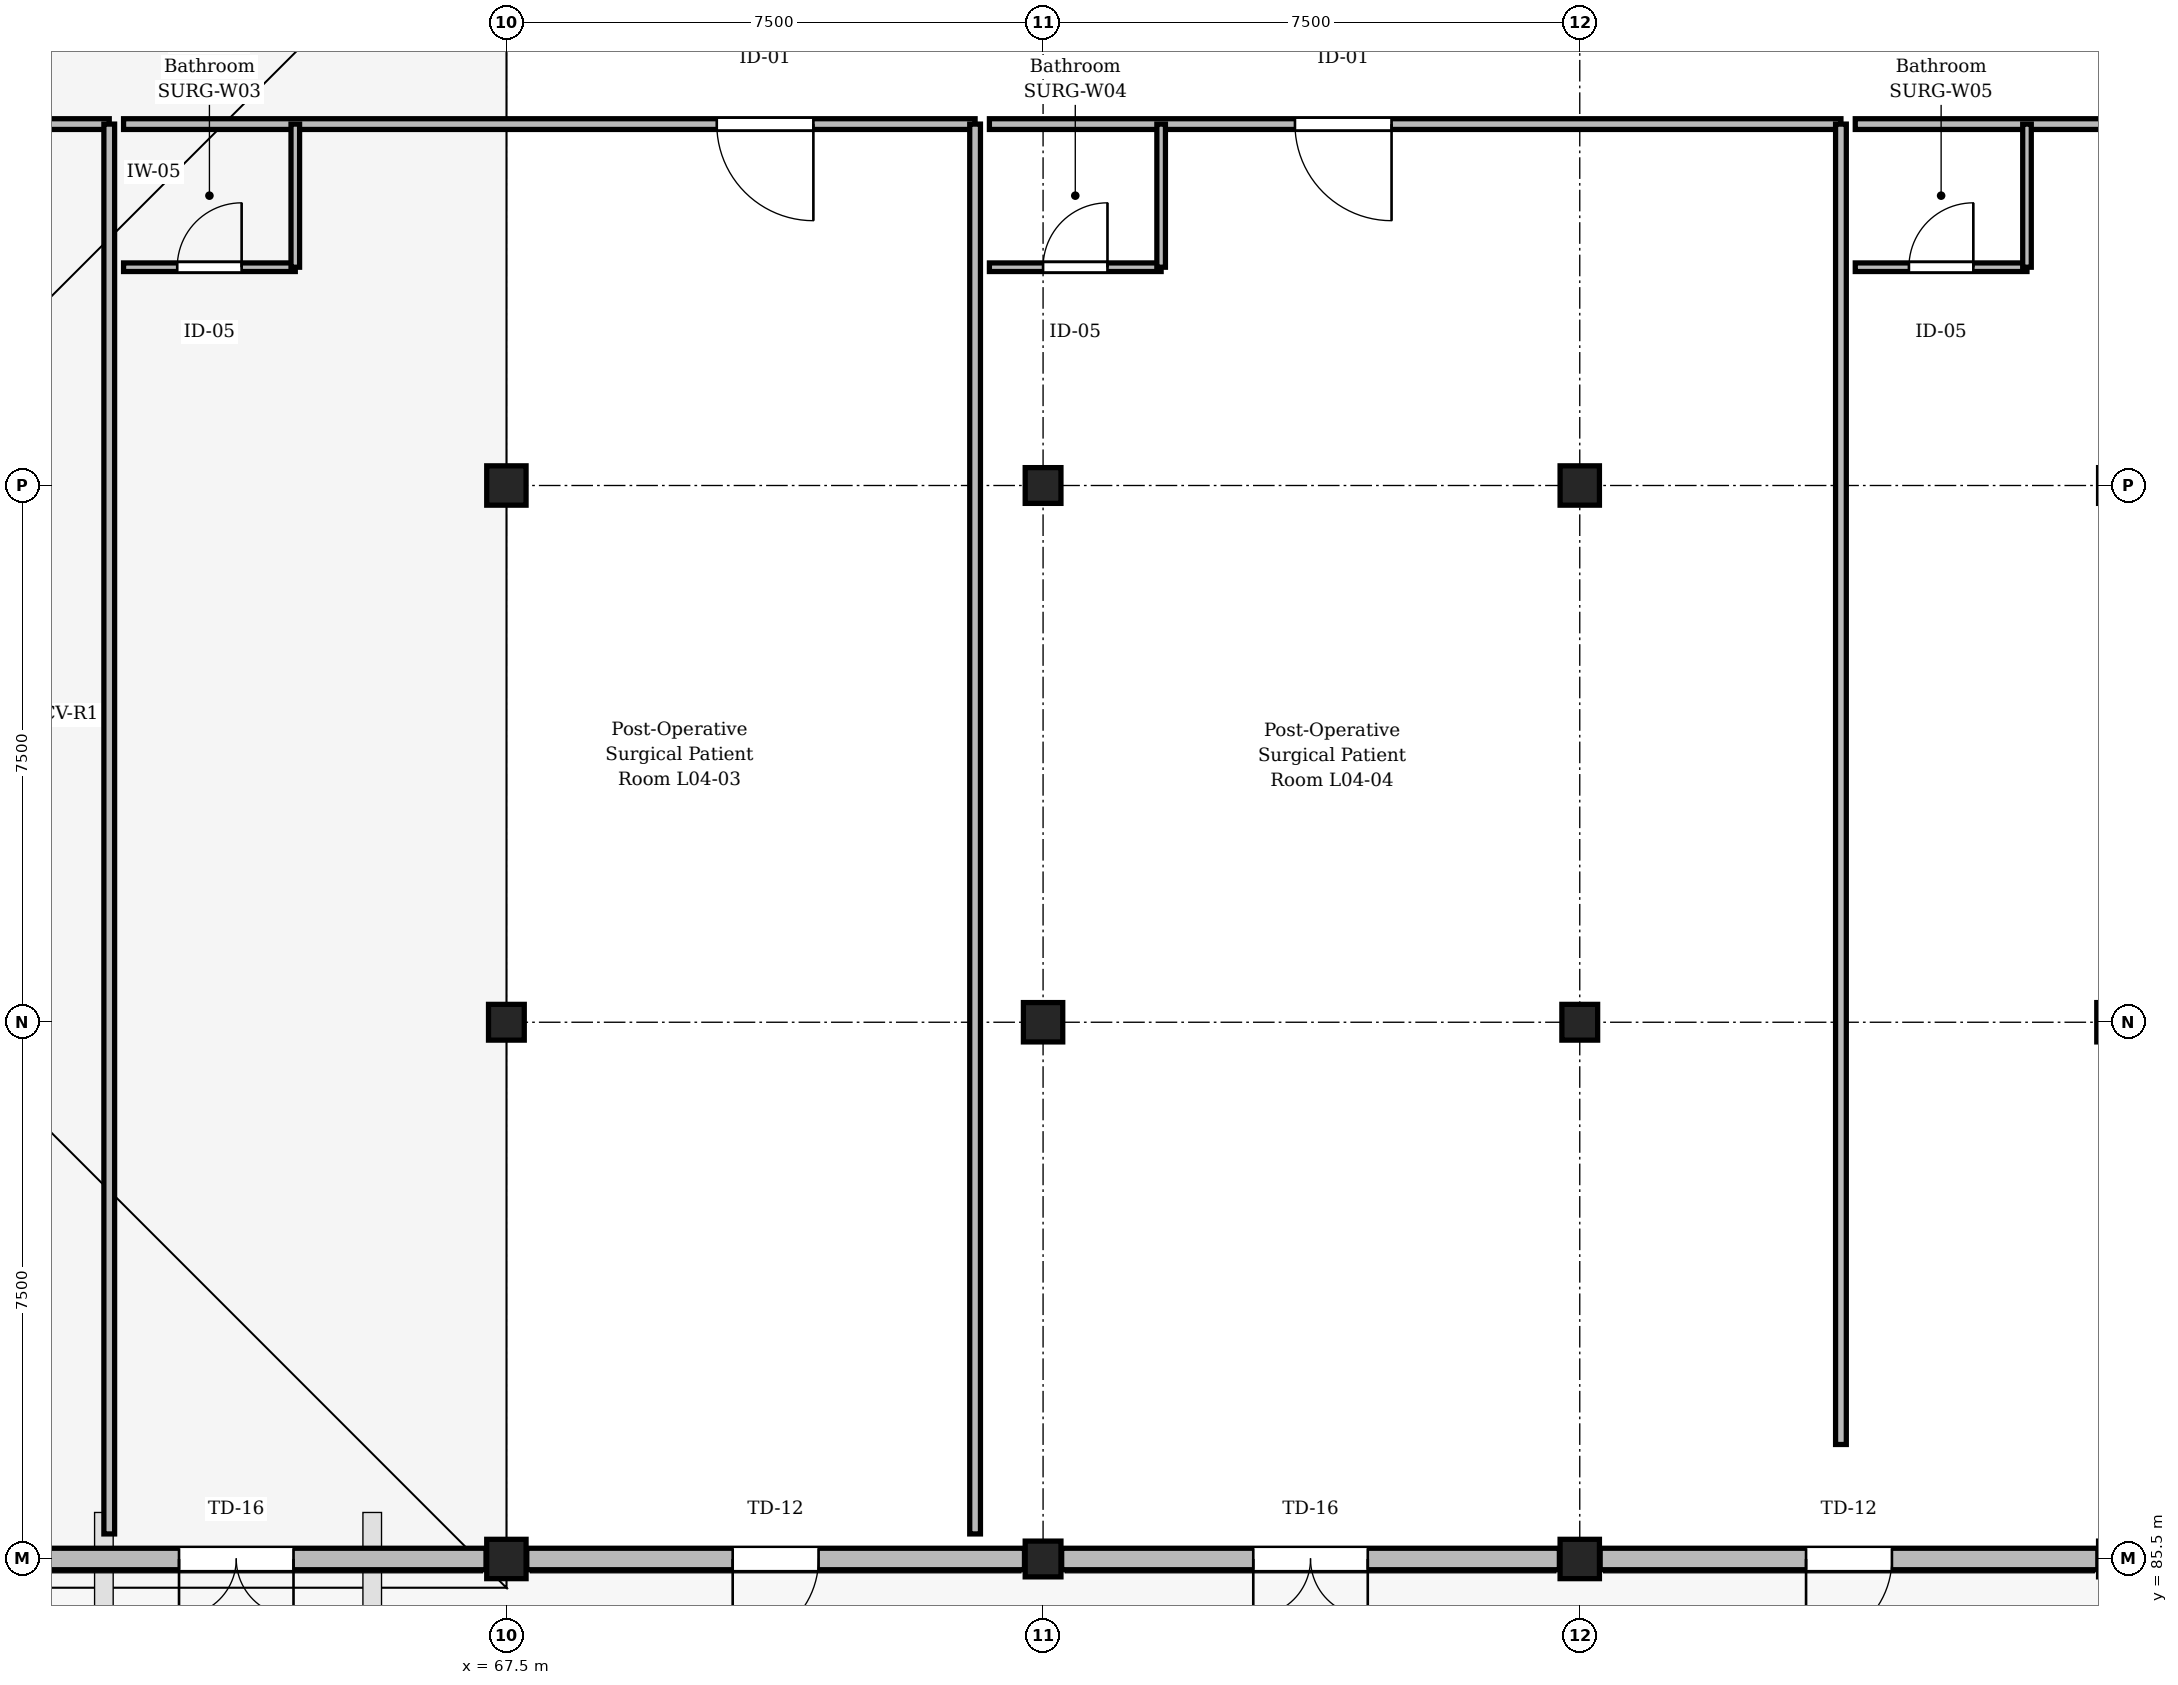
"""IFC4 building model, lengths in metres.
Left out: names, types, materials, properties, quantities, classifications, styles, units other than length and angle.
Written with IfcOpenShell. Run it as: python <this file> out.ifc"""

import sys

from ifc_helpers import new_model, si_unit, direction, frame, frame_2d, origin, origin_2d, place, context, subcontext, project, spatial, rectangle, extrude, element, fill, save


model = new_model("IFC4")
c1 = context("Model", 3, precision=1e-05, world=origin(), true_north=direction((0.0, 1.0)))
c2 = subcontext(c1, "Body", "Model", "MODEL_VIEW")
j1 = project(units=[si_unit("LENGTHUNIT", "METRE"), si_unit("PLANEANGLEUNIT", "RADIAN")], contexts=[c1])
p1 = place(None, origin())
s1 = spatial("IfcSite", under=j1, at=p1, CompositionType="ELEMENT")
p2 = place(p1, origin())
s2 = spatial("IfcBuilding", under=s1, at=p2, CompositionType="ELEMENT")
p3 = place(p2, frame((0.0, 0.0, 17.85)))
s3 = spatial("IfcBuildingStorey", under=s2, at=p3, CompositionType="ELEMENT", Elevation=17.85)
p4 = place(p3, frame((67.5, 85.5, 0.0), z_axis=(0.0, 0.0, 1.0), x_axis=(1.0, 0.0, 0.0)))
e1 = element("IfcColumn", 1, at=p4, inside=s3, PredefinedType="COLUMN", context=c2, shape_type="SweptSolid", body=[
    extrude(rectangle(XDim=0.55, YDim=0.55, at=origin_2d()), origin(), (0.0, 0.0, 1.0), 4.05),
])
p5 = place(p3, frame((67.5, 93.0, 0.0), z_axis=(0.0, 0.0, 1.0), x_axis=(1.0, 0.0, 0.0)))
e2 = element("IfcColumn", 2, at=p5, inside=s3, PredefinedType="COLUMN", context=c2, shape_type="SweptSolid", body=[
    extrude(rectangle(XDim=0.5, YDim=0.5, at=origin_2d()), origin(), (0.0, 0.0, 1.0), 4.05),
])
p6 = place(p3, frame((67.5, 100.5, 0.0), z_axis=(0.0, 0.0, 1.0), x_axis=(1.0, 0.0, 0.0)))
e3 = element("IfcColumn", 3, at=p6, inside=s3, PredefinedType="COLUMN", context=c2, shape_type="SweptSolid", body=[
    extrude(rectangle(XDim=0.55, YDim=0.55, at=origin_2d()), origin(), (0.0, 0.0, 1.0), 4.05),
])
p7 = place(p3, frame((75.0, 85.5, 0.0), z_axis=(0.0, 0.0, 1.0), x_axis=(1.0, 0.0, 0.0)))
e4 = element("IfcColumn", 4, at=p7, inside=s3, PredefinedType="COLUMN", context=c2, shape_type="SweptSolid", body=[
    extrude(rectangle(XDim=0.5, YDim=0.5, at=origin_2d()), origin(), (0.0, 0.0, 1.0), 4.05),
])
p8 = place(p3, frame((75.0, 93.0, 0.0), z_axis=(0.0, 0.0, 1.0), x_axis=(1.0, 0.0, 0.0)))
e5 = element("IfcColumn", 5, at=p8, inside=s3, PredefinedType="COLUMN", context=c2, shape_type="SweptSolid", body=[
    extrude(rectangle(XDim=0.55, YDim=0.55, at=origin_2d()), origin(), (0.0, 0.0, 1.0), 4.05),
])
p9 = place(p3, frame((75.0, 100.5, 0.0), z_axis=(0.0, 0.0, 1.0), x_axis=(1.0, 0.0, 0.0)))
e6 = element("IfcColumn", 6, at=p9, inside=s3, PredefinedType="COLUMN", context=c2, shape_type="SweptSolid", body=[
    extrude(rectangle(XDim=0.5, YDim=0.5, at=origin_2d()), origin(), (0.0, 0.0, 1.0), 4.05),
])
p10 = place(p3, frame((82.5, 85.5, 0.0), z_axis=(0.0, 0.0, 1.0), x_axis=(1.0, 0.0, 0.0)))
e7 = element("IfcColumn", 7, at=p10, inside=s3, PredefinedType="COLUMN", context=c2, shape_type="SweptSolid", body=[
    extrude(rectangle(XDim=0.55, YDim=0.55, at=origin_2d()), origin(), (0.0, 0.0, 1.0), 4.05),
])
p11 = place(p3, frame((82.5, 93.0, 0.0), z_axis=(0.0, 0.0, 1.0), x_axis=(1.0, 0.0, 0.0)))
e8 = element("IfcColumn", 8, at=p11, inside=s3, PredefinedType="COLUMN", context=c2, shape_type="SweptSolid", body=[
    extrude(rectangle(XDim=0.5, YDim=0.5, at=origin_2d()), origin(), (0.0, 0.0, 1.0), 4.05),
])
for number, where, z_axis, x_axis in (
    (9, (82.5, 100.5, 0.0), (0.0, 0.0, 1.0), (1.0, 0.0, 0.0)),
    (10, (90.0, 93.0, 0.0), (0.0, 0.0, 1.0), (1.0, 0.0, 0.0)),
):
    element("IfcColumn", number, at=place(p3, frame(where, z_axis=z_axis, x_axis=x_axis)), inside=s3, PredefinedType="COLUMN", context=c2, shape_type="SweptSolid", body=[
        extrude(rectangle(XDim=0.55, YDim=0.55, at=origin_2d()), origin(), (0.0, 0.0, 1.0), 4.05),
    ])
p12 = place(p3, frame((67.215, 85.5, 0.0), z_axis=(0.0, 0.0, 1.0), x_axis=(-1.0, 0.0, 0.0)))
e11 = element("IfcWall", 11, at=p12, inside=s3, PredefinedType="STANDARD", context=c2, shape_type="SweptSolid", body=[
    extrude(rectangle(XDim=6.98, YDim=0.3, at=frame_2d((3.49, 0.0))), origin(), (0.0, 0.0, 1.0), 3.77),
])
p13 = place(p12, frame((2.69, 0.0, 0.0)))
e12 = element("IfcOpeningElement", 12, at=p13, cuts=e11, PredefinedType="OPENING", context=c2, shape_type="SweptSolid", body=[
    extrude(rectangle(XDim=1.6, YDim=2.35, at=frame_2d((0.8, 1.175))), frame((0.0, 0.16, 0.0), z_axis=(0.0, -1.0, 0.0), x_axis=(1.0, 0.0, 0.0)), (0.0, 0.0, 1.0), 0.32),
])
p14 = place(p3, frame((74.74, 85.5, 0.0), z_axis=(0.0, 0.0, 1.0), x_axis=(-1.0, 0.0, 0.0)))
e13 = element("IfcWall", 13, at=p14, inside=s3, PredefinedType="STANDARD", context=c2, shape_type="SweptSolid", body=[
    extrude(rectangle(XDim=6.955, YDim=0.3, at=frame_2d((3.478, 0.0))), origin(), (0.0, 0.0, 1.0), 3.03),
])
p15 = place(p14, frame((2.877, 0.0, 0.0)))
e14 = element("IfcOpeningElement", 14, at=p15, cuts=e13, PredefinedType="OPENING", context=c2, shape_type="SweptSolid", body=[
    extrude(rectangle(XDim=1.2, YDim=2.3, at=frame_2d((0.6, 1.15))), frame((0.0, 0.16, 0.0), z_axis=(0.0, -1.0, 0.0), x_axis=(1.0, 0.0, 0.0)), (0.0, 0.0, 1.0), 0.32),
])
p16 = place(p3, frame((82.215, 85.5, 0.0), z_axis=(0.0, 0.0, 1.0), x_axis=(-1.0, 0.0, 0.0)))
e15 = element("IfcWall", 15, at=p16, inside=s3, PredefinedType="STANDARD", context=c2, shape_type="SweptSolid", body=[
    extrude(rectangle(XDim=6.955, YDim=0.3, at=frame_2d((3.478, 0.0))), origin(), (0.0, 0.0, 1.0), 3.03),
])
p17 = place(p16, frame((2.677, 0.0, 0.0)))
e16 = element("IfcOpeningElement", 16, at=p17, cuts=e15, PredefinedType="OPENING", context=c2, shape_type="SweptSolid", body=[
    extrude(rectangle(XDim=1.6, YDim=2.35, at=frame_2d((0.8, 1.175))), frame((0.0, 0.16, 0.0), z_axis=(0.0, -1.0, 0.0), x_axis=(1.0, 0.0, 0.0)), (0.0, 0.0, 1.0), 0.32),
])
p18 = place(p3, frame((89.74, 85.5, 0.0), z_axis=(0.0, 0.0, 1.0), x_axis=(-1.0, 0.0, 0.0)))
e17 = element("IfcWall", 17, at=p18, inside=s3, PredefinedType="STANDARD", context=c2, shape_type="SweptSolid", body=[
    extrude(rectangle(XDim=6.955, YDim=0.3, at=frame_2d((3.478, 0.0))), origin(), (0.0, 0.0, 1.0), 3.03),
])
p19 = place(p18, frame((2.877, 0.0, 0.0)))
e18 = element("IfcOpeningElement", 18, at=p19, cuts=e17, PredefinedType="OPENING", context=c2, shape_type="SweptSolid", body=[
    extrude(rectangle(XDim=1.2, YDim=2.3, at=frame_2d((0.6, 1.15))), frame((0.0, 0.16, 0.0), z_axis=(0.0, -1.0, 0.0), x_axis=(1.0, 0.0, 0.0)), (0.0, 0.0, 1.0), 0.32),
])
p20 = place(p3, frame((61.95, 105.55, 0.0), z_axis=(0.0, 0.0, 1.0), x_axis=(-1.0, 0.0, 0.0)))
e19 = element("IfcWall", 19, at=p20, inside=s3, PredefinedType="PARTITIONING", context=c2, shape_type="SweptSolid", body=[
    extrude(rectangle(XDim=11.9, YDim=0.15, at=frame_2d((5.95, 0.0))), origin(), (0.0, 0.0, 1.0), 3.755),
])
p21 = place(p20, frame((5.275, 0.0, 0.0)))
e20 = element("IfcOpeningElement", 20, at=p21, cuts=e19, PredefinedType="OPENING", context=c2, shape_type="SweptSolid", body=[
    extrude(rectangle(XDim=1.35, YDim=2.25, at=frame_2d((0.675, 1.125))), frame((0.0, 0.085, 0.0), z_axis=(0.0, -1.0, 0.0), x_axis=(1.0, 0.0, 0.0)), (0.0, 0.0, 1.0), 0.17),
])
p22 = place(p3, frame((74.05, 105.55, 0.0), z_axis=(0.0, 0.0, 1.0), x_axis=(-1.0, 0.0, 0.0)))
e21 = element("IfcWall", 21, at=p22, inside=s3, PredefinedType="PARTITIONING", context=c2, shape_type="SweptSolid", body=[
    extrude(rectangle(XDim=11.9, YDim=0.15, at=frame_2d((5.95, 0.0))), origin(), (0.0, 0.0, 1.0), 3.755),
])
p23 = place(p22, frame((2.26, 0.0, 0.0)))
e22 = element("IfcOpeningElement", 22, at=p23, cuts=e21, PredefinedType="OPENING", context=c2, shape_type="SweptSolid", body=[
    extrude(rectangle(XDim=1.35, YDim=2.25, at=frame_2d((0.675, 1.125))), frame((0.0, 0.085, 0.0), z_axis=(0.0, -1.0, 0.0), x_axis=(1.0, 0.0, 0.0)), (0.0, 0.0, 1.0), 0.17),
])
p24 = place(p3, frame((62.15, 103.55, 0.0), z_axis=(0.0, 0.0, 1.0), x_axis=(1.0, 0.0, 0.0)))
e23 = element("IfcWall", 23, at=p24, inside=s3, PredefinedType="PARTITIONING", context=c2, shape_type="SweptSolid", body=[
    extrude(rectangle(XDim=2.4, YDim=0.12, at=frame_2d((1.2, 0.0))), origin(), (0.0, 0.0, 1.0), 3.755),
])
p25 = place(p24, frame((0.75, 0.0, 0.0)))
e24 = element("IfcOpeningElement", 24, at=p25, cuts=e23, PredefinedType="OPENING", context=c2, shape_type="SweptSolid", body=[
    extrude(rectangle(XDim=0.9, YDim=2.1, at=frame_2d((0.45, 1.05))), frame((0.0, 0.07, 0.0), z_axis=(0.0, -1.0, 0.0), x_axis=(1.0, 0.0, 0.0)), (0.0, 0.0, 1.0), 0.14),
])
p26 = place(p3, frame((64.55, 103.55, 0.0), z_axis=(0.0, 0.0, 1.0), x_axis=(0.0, 1.0, 0.0)))
e25 = element("IfcWall", 25, at=p26, inside=s3, PredefinedType="PARTITIONING", context=c2, shape_type="SweptSolid", body=[
    extrude(rectangle(XDim=2.0, YDim=0.12, at=frame_2d((1.0, 0.0))), origin(), (0.0, 0.0, 1.0), 3.755),
])
p27 = place(p3, frame((86.15, 105.55, 0.0), z_axis=(0.0, 0.0, 1.0), x_axis=(-1.0, 0.0, 0.0)))
e26 = element("IfcWall", 26, at=p27, inside=s3, PredefinedType="PARTITIONING", context=c2, shape_type="SweptSolid", body=[
    extrude(rectangle(XDim=11.9, YDim=0.15, at=frame_2d((5.95, 0.0))), origin(), (0.0, 0.0, 1.0), 3.755),
])
p28 = place(p27, frame((6.28, 0.0, 0.0)))
e27 = element("IfcOpeningElement", 27, at=p28, cuts=e26, PredefinedType="OPENING", context=c2, shape_type="SweptSolid", body=[
    extrude(rectangle(XDim=1.35, YDim=2.25, at=frame_2d((0.675, 1.125))), frame((0.0, 0.085, 0.0), z_axis=(0.0, -1.0, 0.0), x_axis=(1.0, 0.0, 0.0)), (0.0, 0.0, 1.0), 0.17),
])
p29 = place(p3, frame((74.25, 103.55, 0.0), z_axis=(0.0, 0.0, 1.0), x_axis=(1.0, 0.0, 0.0)))
e28 = element("IfcWall", 28, at=p29, inside=s3, PredefinedType="PARTITIONING", context=c2, shape_type="SweptSolid", body=[
    extrude(rectangle(XDim=2.4, YDim=0.12, at=frame_2d((1.2, 0.0))), origin(), (0.0, 0.0, 1.0), 3.755),
])
p30 = place(p29, frame((0.75, 0.0, 0.0)))
e29 = element("IfcOpeningElement", 29, at=p30, cuts=e28, PredefinedType="OPENING", context=c2, shape_type="SweptSolid", body=[
    extrude(rectangle(XDim=0.9, YDim=2.1, at=frame_2d((0.45, 1.05))), frame((0.0, 0.07, 0.0), z_axis=(0.0, -1.0, 0.0), x_axis=(1.0, 0.0, 0.0)), (0.0, 0.0, 1.0), 0.14),
])
p31 = place(p3, frame((76.65, 103.55, 0.0), z_axis=(0.0, 0.0, 1.0), x_axis=(0.0, 1.0, 0.0)))
e30 = element("IfcWall", 30, at=p31, inside=s3, PredefinedType="PARTITIONING", context=c2, shape_type="SweptSolid", body=[
    extrude(rectangle(XDim=2.0, YDim=0.12, at=frame_2d((1.0, 0.0))), origin(), (0.0, 0.0, 1.0), 3.755),
])
p32 = place(p3, frame((98.25, 105.55, 0.0), z_axis=(0.0, 0.0, 1.0), x_axis=(-1.0, 0.0, 0.0)))
e31 = element("IfcWall", 31, at=p32, inside=s3, PredefinedType="PARTITIONING", context=c2, shape_type="SweptSolid", body=[
    extrude(rectangle(XDim=11.9, YDim=0.15, at=frame_2d((5.95, 0.0))), origin(), (0.0, 0.0, 1.0), 3.755),
])
p33 = place(p32, frame((4.27, 0.0, 0.0)))
e32 = element("IfcOpeningElement", 32, at=p33, cuts=e31, PredefinedType="OPENING", context=c2, shape_type="SweptSolid", body=[
    extrude(rectangle(XDim=1.35, YDim=2.25, at=frame_2d((0.675, 1.125))), frame((0.0, 0.085, 0.0), z_axis=(0.0, -1.0, 0.0), x_axis=(1.0, 0.0, 0.0)), (0.0, 0.0, 1.0), 0.17),
])
p34 = place(p3, frame((86.35, 103.55, 0.0), z_axis=(0.0, 0.0, 1.0), x_axis=(1.0, 0.0, 0.0)))
e33 = element("IfcWall", 33, at=p34, inside=s3, PredefinedType="PARTITIONING", context=c2, shape_type="SweptSolid", body=[
    extrude(rectangle(XDim=2.4, YDim=0.12, at=frame_2d((1.2, 0.0))), origin(), (0.0, 0.0, 1.0), 3.755),
])
p35 = place(p34, frame((0.75, 0.0, 0.0)))
e34 = element("IfcOpeningElement", 34, at=p35, cuts=e33, PredefinedType="OPENING", context=c2, shape_type="SweptSolid", body=[
    extrude(rectangle(XDim=0.9, YDim=2.1, at=frame_2d((0.45, 1.05))), frame((0.0, 0.07, 0.0), z_axis=(0.0, -1.0, 0.0), x_axis=(1.0, 0.0, 0.0)), (0.0, 0.0, 1.0), 0.14),
])
p36 = place(p3, frame((88.75, 103.55, 0.0), z_axis=(0.0, 0.0, 1.0), x_axis=(0.0, 1.0, 0.0)))
e35 = element("IfcWall", 35, at=p36, inside=s3, PredefinedType="PARTITIONING", context=c2, shape_type="SweptSolid", body=[
    extrude(rectangle(XDim=2.0, YDim=0.12, at=frame_2d((1.0, 0.0))), origin(), (0.0, 0.0, 1.0), 3.755),
])
for number, where, z_axis, x_axis in (
    (36, (61.95, 85.85, 0.0), (0.0, 0.0, 1.0), (0.0, 1.0, 0.0)),
    (37, (74.05, 85.85, 0.0), (0.0, 0.0, 1.0), (0.0, 1.0, 0.0)),
):
    element("IfcWall", number, at=place(p3, frame(where, z_axis=z_axis, x_axis=x_axis)), inside=s3, PredefinedType="PARTITIONING", context=c2, shape_type="SweptSolid", body=[
        extrude(rectangle(XDim=19.7, YDim=0.15, at=frame_2d((9.85, 0.0))), origin(), (0.0, 0.0, 1.0), 3.755),
    ])
p37 = place(p3, frame((86.15, 87.1, 0.0), z_axis=(0.0, 0.0, 1.0), x_axis=(0.0, 1.0, 0.0)))
e38 = element("IfcWall", 38, at=p37, inside=s3, PredefinedType="PARTITIONING", context=c2, shape_type="SweptSolid", body=[
    extrude(rectangle(XDim=18.45, YDim=0.15, at=frame_2d((9.225, 0.0))), origin(), (0.0, 0.0, 1.0), 3.215),
])
p38 = place(p13, origin())
e39 = element("IfcDoor", 39, at=p38, inside=s3, OperationType="DOUBLE_DOOR_SINGLE_SWING", PredefinedType="DOOR", context=c2, shape_type="SweptSolid", body=[
    extrude(rectangle(XDim=1.6, YDim=2.35, at=frame_2d((0.8, 1.175))), frame((0.0, 0.025, 0.0), z_axis=(0.0, -1.0, 0.0), x_axis=(1.0, 0.0, 0.0)), (0.0, 0.0, 1.0), 0.05),
])
fill(e12, e39)
p39 = place(p15, origin())
e40 = element("IfcDoor", 40, at=p39, inside=s3, OperationType="SINGLE_SWING_RIGHT", PredefinedType="DOOR", context=c2, shape_type="SweptSolid", body=[
    extrude(rectangle(XDim=1.2, YDim=2.3, at=frame_2d((0.6, 1.15))), frame((0.0, 0.025, 0.0), z_axis=(0.0, -1.0, 0.0), x_axis=(1.0, 0.0, 0.0)), (0.0, 0.0, 1.0), 0.05),
])
fill(e14, e40)
p40 = place(p17, origin())
e41 = element("IfcDoor", 41, at=p40, inside=s3, OperationType="DOUBLE_DOOR_SINGLE_SWING", PredefinedType="DOOR", context=c2, shape_type="SweptSolid", body=[
    extrude(rectangle(XDim=1.6, YDim=2.35, at=frame_2d((0.8, 1.175))), frame((0.0, 0.025, 0.0), z_axis=(0.0, -1.0, 0.0), x_axis=(1.0, 0.0, 0.0)), (0.0, 0.0, 1.0), 0.05),
])
fill(e16, e41)
p41 = place(p19, origin())
e42 = element("IfcDoor", 42, at=p41, inside=s3, OperationType="SINGLE_SWING_RIGHT", PredefinedType="DOOR", context=c2, shape_type="SweptSolid", body=[
    extrude(rectangle(XDim=1.2, YDim=2.3, at=frame_2d((0.6, 1.15))), frame((0.0, 0.025, 0.0), z_axis=(0.0, -1.0, 0.0), x_axis=(1.0, 0.0, 0.0)), (0.0, 0.0, 1.0), 0.05),
])
fill(e18, e42)
p42 = place(p23, origin())
e43 = element("IfcDoor", 43, at=p42, inside=s3, OperationType="SINGLE_SWING_LEFT", PredefinedType="DOOR", context=c2, shape_type="SweptSolid", body=[
    extrude(rectangle(XDim=1.35, YDim=2.25, at=frame_2d((0.675, 1.125))), frame((0.0, 0.025, 0.0), z_axis=(0.0, -1.0, 0.0), x_axis=(1.0, 0.0, 0.0)), (0.0, 0.0, 1.0), 0.05),
])
fill(e22, e43)
p43 = place(p25, origin())
e44 = element("IfcDoor", 44, at=p43, inside=s3, OperationType="SINGLE_SWING_RIGHT", PredefinedType="DOOR", context=c2, shape_type="SweptSolid", body=[
    extrude(rectangle(XDim=0.9, YDim=2.1, at=frame_2d((0.45, 1.05))), frame((0.0, 0.025, 0.0), z_axis=(0.0, -1.0, 0.0), x_axis=(1.0, 0.0, 0.0)), (0.0, 0.0, 1.0), 0.05),
])
fill(e24, e44)
p44 = place(p28, origin())
e45 = element("IfcDoor", 45, at=p44, inside=s3, OperationType="SINGLE_SWING_LEFT", PredefinedType="DOOR", context=c2, shape_type="SweptSolid", body=[
    extrude(rectangle(XDim=1.35, YDim=2.25, at=frame_2d((0.675, 1.125))), frame((0.0, 0.025, 0.0), z_axis=(0.0, -1.0, 0.0), x_axis=(1.0, 0.0, 0.0)), (0.0, 0.0, 1.0), 0.05),
])
fill(e27, e45)
p45 = place(p30, origin())
e46 = element("IfcDoor", 46, at=p45, inside=s3, OperationType="SINGLE_SWING_RIGHT", PredefinedType="DOOR", context=c2, shape_type="SweptSolid", body=[
    extrude(rectangle(XDim=0.9, YDim=2.1, at=frame_2d((0.45, 1.05))), frame((0.0, 0.025, 0.0), z_axis=(0.0, -1.0, 0.0), x_axis=(1.0, 0.0, 0.0)), (0.0, 0.0, 1.0), 0.05),
])
fill(e29, e46)
p46 = place(p35, origin())
e47 = element("IfcDoor", 47, at=p46, inside=s3, OperationType="SINGLE_SWING_RIGHT", PredefinedType="DOOR", context=c2, shape_type="SweptSolid", body=[
    extrude(rectangle(XDim=0.9, YDim=2.1, at=frame_2d((0.45, 1.05))), frame((0.0, 0.025, 0.0), z_axis=(0.0, -1.0, 0.0), x_axis=(1.0, 0.0, 0.0)), (0.0, 0.0, 1.0), 0.05),
])
fill(e34, e47)
save(model, sys.argv[1])
